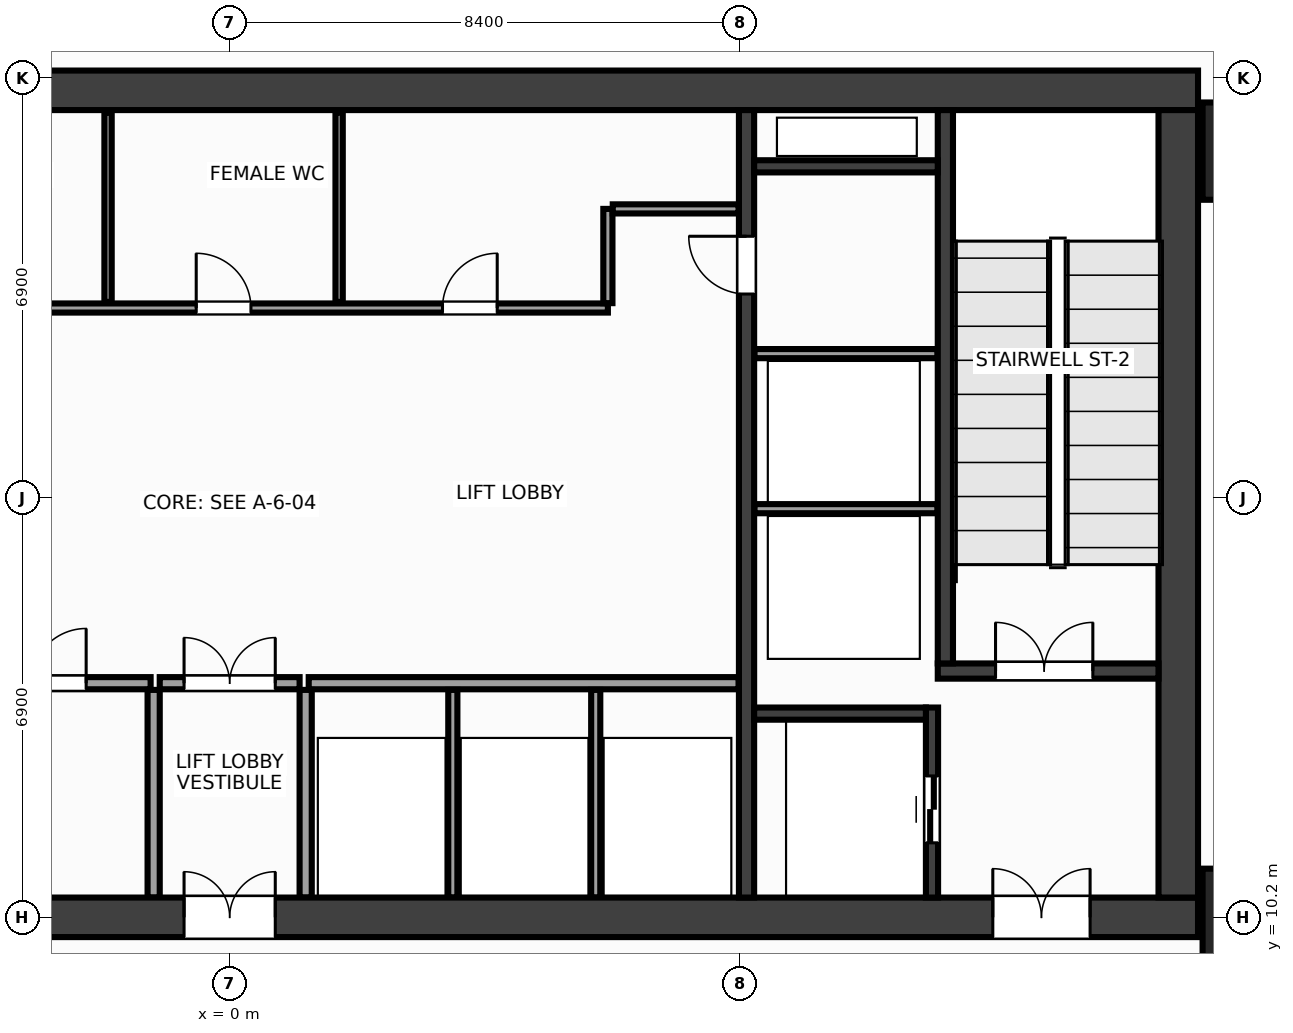
"""IFC4 building model, lengths in metres.
Left out: names, types, materials, properties, quantities, classifications, styles, units other than length and angle.
Written with IfcOpenShell. Run it as: python <this file> out.ifc"""

import sys

from ifc_helpers import new_model, si_unit, direction, frame, frame_2d, origin, origin_2d, place, context, subcontext, project, spatial, rectangle, extrude, source, transform, mapped, element, fill, save


model = new_model("IFC4")
c1 = context("Model", 3, precision=1e-05, world=origin(), true_north=direction((0.0, 1.0)))
c2 = subcontext(c1, "Body", "Model", "MODEL_VIEW")
j1 = project(units=[si_unit("LENGTHUNIT", "METRE"), si_unit("PLANEANGLEUNIT", "RADIAN")], contexts=[c1])
p1 = place(None, origin())
s1 = spatial("IfcSite", under=j1, at=p1, CompositionType="ELEMENT")
p2 = place(p1, origin())
s2 = spatial("IfcBuilding", under=s1, at=p2, CompositionType="ELEMENT")
p3 = place(p2, frame((0.0, 0.0, 124.4)))
s3 = spatial("IfcBuildingStorey", under=s2, at=p3, CompositionType="ELEMENT", Elevation=124.4)
m1 = source(origin(), c2, "Body", "SweptSolid", [
    extrude(rectangle(XDim=31.85, YDim=0.65, at=frame_2d((15.925, 0.0))), origin(), (0.0, 0.0, 1.0), 7.2),
])
p4 = place(p3, frame((-15.925, 23.8, 0.0), z_axis=(0.0, 0.0, 1.0), x_axis=(1.0, 0.0, 0.0)))
e1 = element("IfcWall", 1, at=p4, inside=s3, PredefinedType="SHEAR", context=c2, shape_type="MappedRepresentation", body=[
    mapped(m1, transform((0.0, 0.0, 0.0), x_axis=(1.0, 0.0, 0.0), y_axis=(0.0, 1.0, 0.0), z_axis=(0.0, 0.0, 1.0), scale=1.0)),
])
p5 = place(p3, frame((-15.925, 10.2, 0.0), z_axis=(0.0, 0.0, 1.0), x_axis=(1.0, 0.0, 0.0)))
e2 = element("IfcWall", 2, at=p5, inside=s3, PredefinedType="SHEAR", context=c2, shape_type="MappedRepresentation", body=[
    mapped(m1, transform((0.0, 0.0, 0.0), x_axis=(1.0, 0.0, 0.0), y_axis=(0.0, 1.0, 0.0), z_axis=(0.0, 0.0, 1.0), scale=1.0)),
])
p6 = place(p5, frame((1.775, 0.0, 0.0)))
e3 = element("IfcOpeningElement", 3, at=p6, cuts=e2, PredefinedType="OPENING", context=c2, shape_type="SweptSolid", body=[
    extrude(rectangle(XDim=1.6, YDim=2.15, at=frame_2d((0.8, 1.075))), frame((0.0, 0.337, 0.0), z_axis=(0.0, -1.0, 0.0), x_axis=(1.0, 0.0, 0.0)), (0.0, 0.0, 1.0), 0.674),
])
p7 = place(p5, frame((28.475, 0.0, 0.0)))
e4 = element("IfcOpeningElement", 4, at=p7, cuts=e2, PredefinedType="OPENING", context=c2, shape_type="SweptSolid", body=[
    extrude(rectangle(XDim=1.6, YDim=2.15, at=frame_2d((0.8, 1.075))), frame((0.0, 0.337, 0.0), z_axis=(0.0, -1.0, 0.0), x_axis=(1.0, 0.0, 0.0)), (0.0, 0.0, 1.0), 0.674),
])
p8 = place(p5, frame((15.175, 0.0, 0.0)))
e5 = element("IfcOpeningElement", 5, at=p8, cuts=e2, PredefinedType="OPENING", context=c2, shape_type="SweptSolid", body=[
    extrude(rectangle(XDim=1.5, YDim=2.2, at=frame_2d((0.75, 1.1))), frame((0.0, 0.337, 0.0), z_axis=(0.0, -1.0, 0.0), x_axis=(1.0, 0.0, 0.0)), (0.0, 0.0, 1.0), 0.674),
])
m2 = source(origin(), c2, "Body", "SweptSolid", [
    extrude(rectangle(XDim=12.95, YDim=0.65, at=frame_2d((6.475, 0.0))), origin(), (0.0, 0.0, 1.0), 7.2),
])
p9 = place(p3, frame((15.6, 10.525, 0.0), z_axis=(0.0, 0.0, 1.0), x_axis=(0.0, 1.0, 0.0)))
e6 = element("IfcWall", 6, at=p9, inside=s3, PredefinedType="SHEAR", context=c2, shape_type="MappedRepresentation", body=[
    mapped(m2, transform((0.0, 0.0, 0.0), x_axis=(1.0, 0.0, 0.0), y_axis=(0.0, 1.0, 0.0), z_axis=(0.0, 0.0, 1.0), scale=1.0)),
])
m3 = source(origin(), c2, "Body", "SweptSolid", [
    extrude(rectangle(XDim=12.95, YDim=0.25, at=frame_2d((6.475, 0.0))), origin(), (0.0, 0.0, 1.0), 7.2),
])
p10 = place(p3, frame((8.5, 10.525, 0.0), z_axis=(0.0, 0.0, 1.0), x_axis=(0.0, 1.0, 0.0)))
e7 = element("IfcWall", 7, at=p10, inside=s3, PredefinedType="SHEAR", context=c2, shape_type="MappedRepresentation", body=[
    mapped(m3, transform((0.0, 0.0, 0.0), x_axis=(1.0, 0.0, 0.0), y_axis=(0.0, 1.0, 0.0), z_axis=(0.0, 0.0, 1.0), scale=1.0)),
])
p11 = place(p10, frame((9.925, 0.0, 0.0)))
e8 = element("IfcOpeningElement", 8, at=p11, cuts=e7, PredefinedType="OPENING", context=c2, shape_type="SweptSolid", body=[
    extrude(rectangle(XDim=0.95, YDim=2.15, at=frame_2d((0.475, 1.075))), frame((0.0, 0.137, 0.0), z_axis=(0.0, -1.0, 0.0), x_axis=(1.0, 0.0, 0.0)), (0.0, 0.0, 1.0), 0.274),
])
m4 = source(origin(), c2, "Body", "SweptSolid", [
    extrude(rectangle(XDim=3.63, YDim=0.25, at=frame_2d((1.815, 0.0))), origin(), (0.0, 0.0, 1.0), 7.2),
])
p12 = place(p3, frame((11.645, 14.25, 0.0), z_axis=(0.0, 0.0, 1.0), x_axis=(1.0, 0.0, 0.0)))
e9 = element("IfcWall", 9, at=p12, inside=s3, PredefinedType="SHEAR", context=c2, shape_type="MappedRepresentation", body=[
    mapped(m4, transform((0.0, 0.0, 0.0), x_axis=(1.0, 0.0, 0.0), y_axis=(0.0, 1.0, 0.0), z_axis=(0.0, 0.0, 1.0), scale=1.0)),
])
p13 = place(p12, frame((0.95, 0.0, 0.0)))
e10 = element("IfcOpeningElement", 10, at=p13, cuts=e9, PredefinedType="OPENING", context=c2, shape_type="SweptSolid", body=[
    extrude(rectangle(XDim=1.6, YDim=2.15, at=frame_2d((0.8, 1.075))), frame((0.0, 0.137, 0.0), z_axis=(0.0, -1.0, 0.0), x_axis=(1.0, 0.0, 0.0)), (0.0, 0.0, 1.0), 0.274),
])
m5 = source(origin(), c2, "Body", "SweptSolid", [
    extrude(rectangle(XDim=9.1, YDim=0.25, at=frame_2d((4.55, 0.0))), origin(), (0.0, 0.0, 1.0), 7.2),
])
p14 = place(p3, frame((11.77, 14.375, 0.0), z_axis=(0.0, 0.0, 1.0), x_axis=(0.0, 1.0, 0.0)))
e11 = element("IfcWall", 11, at=p14, inside=s3, PredefinedType="SHEAR", context=c2, shape_type="MappedRepresentation", body=[
    mapped(m5, transform((0.0, 0.0, 0.0), x_axis=(1.0, 0.0, 0.0), y_axis=(0.0, 1.0, 0.0), z_axis=(0.0, 0.0, 1.0), scale=1.0)),
])
m6 = source(origin(), c2, "Body", "SweptSolid", [
    extrude(rectangle(XDim=3.125, YDim=0.2, at=frame_2d((1.562, 0.0))), origin(), (0.0, 0.0, 1.0), 7.2),
])
p15 = place(p3, frame((11.55, 10.525, 0.0), z_axis=(0.0, 0.0, 1.0), x_axis=(0.0, 1.0, 0.0)))
e12 = element("IfcWall", 12, at=p15, inside=s3, PredefinedType="SHEAR", context=c2, shape_type="MappedRepresentation", body=[
    mapped(m6, transform((0.0, 0.0, 0.0), x_axis=(1.0, 0.0, 0.0), y_axis=(0.0, 1.0, 0.0), z_axis=(0.0, 0.0, 1.0), scale=1.0)),
])
p16 = place(p15, frame((0.9, 0.0, 0.0)))
e13 = element("IfcOpeningElement", 13, at=p16, cuts=e12, PredefinedType="OPENING", context=c2, shape_type="SweptSolid", body=[
    extrude(rectangle(XDim=1.1, YDim=2.15, at=frame_2d((0.55, 1.075))), frame((0.0, 0.112, 0.0), z_axis=(0.0, -1.0, 0.0), x_axis=(1.0, 0.0, 0.0)), (0.0, 0.0, 1.0), 0.224),
])
m7 = source(origin(), c2, "Body", "SweptSolid", [
    extrude(rectangle(XDim=2.825, YDim=0.2, at=frame_2d((1.413, 0.0))), origin(), (0.0, 0.0, 1.0), 7.2),
])
p17 = place(p3, frame((8.625, 13.55, 0.0), z_axis=(0.0, 0.0, 1.0), x_axis=(1.0, 0.0, 0.0)))
e14 = element("IfcWall", 14, at=p17, inside=s3, PredefinedType="SHEAR", context=c2, shape_type="MappedRepresentation", body=[
    mapped(m7, transform((0.0, 0.0, 0.0), x_axis=(1.0, 0.0, 0.0), y_axis=(0.0, 1.0, 0.0), z_axis=(0.0, 0.0, 1.0), scale=1.0)),
])
m8 = source(origin(), c2, "Body", "SweptSolid", [
    extrude(rectangle(XDim=3.02, YDim=0.2, at=frame_2d((1.51, 0.0))), origin(), (0.0, 0.0, 1.0), 7.2),
])
p18 = place(p3, frame((8.625, 22.55, 0.0), z_axis=(0.0, 0.0, 1.0), x_axis=(1.0, 0.0, 0.0)))
e15 = element("IfcWall", 15, at=p18, inside=s3, PredefinedType="SHEAR", context=c2, shape_type="MappedRepresentation", body=[
    mapped(m8, transform((0.0, 0.0, 0.0), x_axis=(1.0, 0.0, 0.0), y_axis=(0.0, 1.0, 0.0), z_axis=(0.0, 0.0, 1.0), scale=1.0)),
])
m9 = source(origin(), c2, "Body", "SweptSolid", [
    extrude(rectangle(XDim=1.6, YDim=1.6, at=origin_2d()), origin(), (0.0, 0.0, 1.0), 7.2),
])
for number, where, z_axis, x_axis in (
    (16, (16.8, 10.2, 0.0), (0.0, 0.0, 1.0), (1.0, 0.0, 0.0)),
    (17, (16.8, 22.8, 0.0), (0.0, 0.0, 1.0), (1.0, 0.0, 0.0)),
):
    element("IfcColumn", number, at=place(p3, frame(where, z_axis=z_axis, x_axis=x_axis)), inside=s3, PredefinedType="COLUMN", context=c2, shape_type="MappedRepresentation", body=[
        mapped(m9, transform((0.0, 0.0, 0.0), x_axis=(1.0, 0.0, 0.0), y_axis=(0.0, 1.0, 0.0), z_axis=(0.0, 0.0, 1.0), scale=1.0)),
    ])
m10 = source(origin(), c2, "Body", "SweptSolid", [
    extrude(rectangle(XDim=3.01, YDim=0.15, at=frame_2d((1.505, 0.0))), origin(), (0.0, 0.0, 1.0), 6.9),
])
for number, where, z_axis, x_axis in (
    (18, (8.63, 16.92, 0.0), (0.0, 0.0, 1.0), (1.0, 0.0, 0.0)),
    (19, (8.63, 19.47, 0.0), (0.0, 0.0, 1.0), (1.0, 0.0, 0.0)),
):
    element("IfcWall", number, at=place(p3, frame(where, z_axis=z_axis, x_axis=x_axis)), inside=s3, PredefinedType="PARTITIONING", context=c2, shape_type="MappedRepresentation", body=[
        mapped(m10, transform((0.0, 0.0, 0.0), x_axis=(1.0, 0.0, 0.0), y_axis=(0.0, 1.0, 0.0), z_axis=(0.0, 0.0, 1.0), scale=1.0)),
    ])
m11 = source(origin(), c2, "Body", "SweptSolid", [
    extrude(rectangle(XDim=7.07, YDim=0.2, at=frame_2d((3.535, 0.0))), origin(), (0.0, 0.0, 1.0), 6.9),
])
p19 = place(p3, frame((-8.37, 14.05, 0.0), z_axis=(0.0, 0.0, 1.0), x_axis=(1.0, 0.0, 0.0)))
e20 = element("IfcWall", 20, at=p19, inside=s3, PredefinedType="PARTITIONING", context=c2, shape_type="MappedRepresentation", body=[
    mapped(m11, transform((0.0, 0.0, 0.0), x_axis=(1.0, 0.0, 0.0), y_axis=(0.0, 1.0, 0.0), z_axis=(0.0, 0.0, 1.0), scale=1.0)),
])
p20 = place(p19, frame((1.66, 0.0, 0.0)))
e21 = element("IfcOpeningElement", 21, at=p20, cuts=e20, PredefinedType="OPENING", context=c2, shape_type="SweptSolid", body=[
    extrude(rectangle(XDim=0.9, YDim=2.15, at=frame_2d((0.45, 1.075))), frame((0.0, 0.112, 0.0), z_axis=(0.0, -1.0, 0.0), x_axis=(1.0, 0.0, 0.0)), (0.0, 0.0, 1.0), 0.224),
])
p21 = place(p19, frame((5.11, 0.0, 0.0)))
e22 = element("IfcOpeningElement", 22, at=p21, cuts=e20, PredefinedType="OPENING", context=c2, shape_type="SweptSolid", body=[
    extrude(rectangle(XDim=0.9, YDim=2.15, at=frame_2d((0.45, 1.075))), frame((0.0, 0.112, 0.0), z_axis=(0.0, -1.0, 0.0), x_axis=(1.0, 0.0, 0.0)), (0.0, 0.0, 1.0), 0.224),
])
p22 = place(p3, frame((1.3, 14.05, 0.0), z_axis=(0.0, 0.0, 1.0), x_axis=(1.0, 0.0, 0.0)))
e23 = element("IfcWall", 23, at=p22, inside=s3, PredefinedType="PARTITIONING", context=c2, shape_type="MappedRepresentation", body=[
    mapped(m11, transform((0.0, 0.0, 0.0), x_axis=(1.0, 0.0, 0.0), y_axis=(0.0, 1.0, 0.0), z_axis=(0.0, 0.0, 1.0), scale=1.0)),
])
m12 = source(origin(), c2, "Body", "SweptSolid", [
    extrude(rectangle(XDim=3.415, YDim=0.2, at=frame_2d((1.708, 0.0))), origin(), (0.0, 0.0, 1.0), 6.9),
])
for number, where, z_axis, x_axis in (
    (24, (-1.25, 10.525, 0.0), (0.0, 0.0, 1.0), (0.0, 1.0, 0.0)),
    (25, (1.25, 10.525, 0.0), (0.0, 0.0, 1.0), (0.0, 1.0, 0.0)),
):
    element("IfcWall", number, at=place(p3, frame(where, z_axis=z_axis, x_axis=x_axis)), inside=s3, PredefinedType="PARTITIONING", context=c2, shape_type="MappedRepresentation", body=[
        mapped(m12, transform((0.0, 0.0, 0.0), x_axis=(1.0, 0.0, 0.0), y_axis=(0.0, 1.0, 0.0), z_axis=(0.0, 0.0, 1.0), scale=1.0)),
    ])
m13 = source(origin(), c2, "Body", "SweptSolid", [
    extrude(rectangle(XDim=2.3, YDim=0.2, at=frame_2d((1.15, 0.0))), origin(), (0.0, 0.0, 1.0), 6.9),
])
p23 = place(p3, frame((-1.15, 14.05, 0.0), z_axis=(0.0, 0.0, 1.0), x_axis=(1.0, 0.0, 0.0)))
e26 = element("IfcWall", 26, at=p23, inside=s3, PredefinedType="PARTITIONING", context=c2, shape_type="MappedRepresentation", body=[
    mapped(m13, transform((0.0, 0.0, 0.0), x_axis=(1.0, 0.0, 0.0), y_axis=(0.0, 1.0, 0.0), z_axis=(0.0, 0.0, 1.0), scale=1.0)),
])
p24 = place(p23, frame((0.4, 0.0, 0.0)))
e27 = element("IfcOpeningElement", 27, at=p24, cuts=e26, PredefinedType="OPENING", context=c2, shape_type="SweptSolid", body=[
    extrude(rectangle(XDim=1.5, YDim=2.2, at=frame_2d((0.75, 1.1))), frame((0.0, 0.112, 0.0), z_axis=(0.0, -1.0, 0.0), x_axis=(1.0, 0.0, 0.0)), (0.0, 0.0, 1.0), 0.224),
])
m14 = source(origin(), c2, "Body", "SweptSolid", [
    extrude(rectangle(XDim=14.59, YDim=0.15, at=frame_2d((7.295, 0.0))), origin(), (0.0, 0.0, 1.0), 6.9),
])
p25 = place(p3, frame((-8.37, 20.22, 0.0), z_axis=(0.0, 0.0, 1.0), x_axis=(1.0, 0.0, 0.0)))
e28 = element("IfcWall", 28, at=p25, inside=s3, PredefinedType="PARTITIONING", context=c2, shape_type="MappedRepresentation", body=[
    mapped(m14, transform((0.0, 0.0, 0.0), x_axis=(1.0, 0.0, 0.0), y_axis=(0.0, 1.0, 0.0), z_axis=(0.0, 0.0, 1.0), scale=1.0)),
])
p26 = place(p25, frame((1.06, 0.0, 0.0)))
e29 = element("IfcOpeningElement", 29, at=p26, cuts=e28, PredefinedType="OPENING", context=c2, shape_type="SweptSolid", body=[
    extrude(rectangle(XDim=0.9, YDim=2.15, at=frame_2d((0.45, 1.075))), frame((0.0, 0.087, 0.0), z_axis=(0.0, -1.0, 0.0), x_axis=(1.0, 0.0, 0.0)), (0.0, 0.0, 1.0), 0.174),
])
p27 = place(p25, frame((4.22, 0.0, 0.0)))
e30 = element("IfcOpeningElement", 30, at=p27, cuts=e28, PredefinedType="OPENING", context=c2, shape_type="SweptSolid", body=[
    extrude(rectangle(XDim=0.9, YDim=2.15, at=frame_2d((0.45, 1.075))), frame((0.0, 0.087, 0.0), z_axis=(0.0, -1.0, 0.0), x_axis=(1.0, 0.0, 0.0)), (0.0, 0.0, 1.0), 0.174),
])
p28 = place(p25, frame((7.82, 0.0, 0.0)))
e31 = element("IfcOpeningElement", 31, at=p28, cuts=e28, PredefinedType="OPENING", context=c2, shape_type="SweptSolid", body=[
    extrude(rectangle(XDim=0.9, YDim=2.15, at=frame_2d((0.45, 1.075))), frame((0.0, 0.087, 0.0), z_axis=(0.0, -1.0, 0.0), x_axis=(1.0, 0.0, 0.0)), (0.0, 0.0, 1.0), 0.174),
])
p29 = place(p25, frame((11.87, 0.0, 0.0)))
e32 = element("IfcOpeningElement", 32, at=p29, cuts=e28, PredefinedType="OPENING", context=c2, shape_type="SweptSolid", body=[
    extrude(rectangle(XDim=0.9, YDim=2.15, at=frame_2d((0.45, 1.075))), frame((0.0, 0.087, 0.0), z_axis=(0.0, -1.0, 0.0), x_axis=(1.0, 0.0, 0.0)), (0.0, 0.0, 1.0), 0.174),
])
m15 = source(origin(), c2, "Body", "SweptSolid", [
    extrude(rectangle(XDim=1.55, YDim=0.15, at=frame_2d((0.775, 0.0))), origin(), (0.0, 0.0, 1.0), 6.9),
])
p30 = place(p3, frame((6.22, 20.3, 0.0), z_axis=(0.0, 0.0, 1.0), x_axis=(0.0, 1.0, 0.0)))
e33 = element("IfcWall", 33, at=p30, inside=s3, PredefinedType="PARTITIONING", context=c2, shape_type="MappedRepresentation", body=[
    mapped(m15, transform((0.0, 0.0, 0.0), x_axis=(1.0, 0.0, 0.0), y_axis=(0.0, 1.0, 0.0), z_axis=(0.0, 0.0, 1.0), scale=1.0)),
])
m16 = source(origin(), c2, "Body", "SweptSolid", [
    extrude(rectangle(XDim=2.07, YDim=0.15, at=frame_2d((1.035, 0.0))), origin(), (0.0, 0.0, 1.0), 6.9),
])
p31 = place(p3, frame((6.3, 21.85, 0.0), z_axis=(0.0, 0.0, 1.0), x_axis=(1.0, 0.0, 0.0)))
e34 = element("IfcWall", 34, at=p31, inside=s3, PredefinedType="PARTITIONING", context=c2, shape_type="MappedRepresentation", body=[
    mapped(m16, transform((0.0, 0.0, 0.0), x_axis=(1.0, 0.0, 0.0), y_axis=(0.0, 1.0, 0.0), z_axis=(0.0, 0.0, 1.0), scale=1.0)),
])
m17 = source(origin(), c2, "Body", "SweptSolid", [
    extrude(rectangle(XDim=3.415, YDim=0.15, at=frame_2d((1.708, 0.0))), origin(), (0.0, 0.0, 1.0), 6.9),
])
for number, where, z_axis, x_axis in (
    (35, (3.67, 10.525, 0.0), (0.0, 0.0, 1.0), (0.0, 1.0, 0.0)),
    (36, (6.02, 10.525, 0.0), (0.0, 0.0, 1.0), (0.0, 1.0, 0.0)),
):
    element("IfcWall", number, at=place(p3, frame(where, z_axis=z_axis, x_axis=x_axis)), inside=s3, PredefinedType="PARTITIONING", context=c2, shape_type="MappedRepresentation", body=[
        mapped(m17, transform((0.0, 0.0, 0.0), x_axis=(1.0, 0.0, 0.0), y_axis=(0.0, 1.0, 0.0), z_axis=(0.0, 0.0, 1.0), scale=1.0)),
    ])
m18 = source(origin(), c2, "Body", "SweptSolid", [
    extrude(rectangle(XDim=3.115, YDim=0.12, at=frame_2d((1.558, 0.0))), origin(), (0.0, 0.0, 1.0), 6.9),
])
for number, where, z_axis, x_axis in (
    (37, (-2.0, 20.32, 0.0), (0.0, 0.0, 1.0), (0.0, 1.0, 0.0)),
    (38, (1.8, 20.32, 0.0), (0.0, 0.0, 1.0), (0.0, 1.0, 0.0)),
):
    element("IfcWall", number, at=place(p3, frame(where, z_axis=z_axis, x_axis=x_axis)), inside=s3, PredefinedType="PARTITIONING", context=c2, shape_type="MappedRepresentation", body=[
        mapped(m18, transform((0.0, 0.0, 0.0), x_axis=(1.0, 0.0, 0.0), y_axis=(0.0, 1.0, 0.0), z_axis=(0.0, 0.0, 1.0), scale=1.0)),
    ])
m19 = source(origin(), c2, "Body", "SweptSolid", [
    extrude(rectangle(XDim=1.6, YDim=2.15, at=frame_2d((0.8, 1.075))), frame((0.0, 0.025, 0.0), z_axis=(0.0, -1.0, 0.0), x_axis=(1.0, 0.0, 0.0)), (0.0, 0.0, 1.0), 0.05),
])
p32 = place(p13, origin())
e39 = element("IfcDoor", 39, at=p32, inside=s3, OperationType="DOUBLE_DOOR_SINGLE_SWING", PredefinedType="DOOR", context=c2, shape_type="MappedRepresentation", body=[
    mapped(m19, transform((0.0, 0.0, 0.0), x_axis=(1.0, 0.0, 0.0), y_axis=(0.0, 1.0, 0.0), z_axis=(0.0, 0.0, 1.0), scale=1.0)),
])
fill(e10, e39)
p33 = place(p7, origin())
e40 = element("IfcDoor", 40, at=p33, inside=s3, OperationType="DOUBLE_DOOR_SINGLE_SWING", PredefinedType="DOOR", context=c2, shape_type="MappedRepresentation", body=[
    mapped(m19, transform((0.0, 0.0, 0.0), x_axis=(1.0, 0.0, 0.0), y_axis=(0.0, 1.0, 0.0), z_axis=(0.0, 0.0, 1.0), scale=1.0)),
])
fill(e4, e40)
m20 = source(origin(), c2, "Body", "SweptSolid", [
    extrude(rectangle(XDim=1.1, YDim=2.15, at=frame_2d((0.55, 1.075))), frame((0.0, 0.025, 0.0), z_axis=(0.0, -1.0, 0.0), x_axis=(1.0, 0.0, 0.0)), (0.0, 0.0, 1.0), 0.05),
])
p34 = place(p16, origin())
e41 = element("IfcDoor", 41, at=p34, inside=s3, OperationType="DOUBLE_DOOR_SLIDING", PredefinedType="DOOR", context=c2, shape_type="MappedRepresentation", body=[
    mapped(m20, transform((0.0, 0.0, 0.0), x_axis=(1.0, 0.0, 0.0), y_axis=(0.0, 1.0, 0.0), z_axis=(0.0, 0.0, 1.0), scale=1.0)),
])
fill(e13, e41)
m21 = source(origin(), c2, "Body", "SweptSolid", [
    extrude(rectangle(XDim=0.95, YDim=2.15, at=frame_2d((0.475, 1.075))), frame((0.0, 0.025, 0.0), z_axis=(0.0, -1.0, 0.0), x_axis=(1.0, 0.0, 0.0)), (0.0, 0.0, 1.0), 0.05),
])
p35 = place(p11, origin())
e42 = element("IfcDoor", 42, at=p35, inside=s3, OperationType="SINGLE_SWING_RIGHT", PredefinedType="DOOR", context=c2, shape_type="MappedRepresentation", body=[
    mapped(m21, transform((0.0, 0.0, 0.0), x_axis=(1.0, 0.0, 0.0), y_axis=(0.0, 1.0, 0.0), z_axis=(0.0, 0.0, 1.0), scale=1.0)),
])
fill(e8, e42)
m22 = source(origin(), c2, "Body", "SweptSolid", [
    extrude(rectangle(XDim=0.9, YDim=2.15, at=frame_2d((0.45, 1.075))), frame((0.0, 0.025, 0.0), z_axis=(0.0, -1.0, 0.0), x_axis=(1.0, 0.0, 0.0)), (0.0, 0.0, 1.0), 0.05),
])
p36 = place(p21, origin())
e43 = element("IfcDoor", 43, at=p36, inside=s3, OperationType="SINGLE_SWING_RIGHT", PredefinedType="DOOR", context=c2, shape_type="MappedRepresentation", body=[
    mapped(m22, transform((0.0, 0.0, 0.0), x_axis=(1.0, 0.0, 0.0), y_axis=(0.0, 1.0, 0.0), z_axis=(0.0, 0.0, 1.0), scale=1.0)),
])
fill(e22, e43)
m23 = source(origin(), c2, "Body", "SweptSolid", [
    extrude(rectangle(XDim=1.5, YDim=2.2, at=frame_2d((0.75, 1.1))), frame((0.0, 0.025, 0.0), z_axis=(0.0, -1.0, 0.0), x_axis=(1.0, 0.0, 0.0)), (0.0, 0.0, 1.0), 0.05),
])
p37 = place(p24, origin())
e44 = element("IfcDoor", 44, at=p37, inside=s3, OperationType="DOUBLE_DOOR_SINGLE_SWING", PredefinedType="DOOR", context=c2, shape_type="MappedRepresentation", body=[
    mapped(m23, transform((0.0, 0.0, 0.0), x_axis=(1.0, 0.0, 0.0), y_axis=(0.0, 1.0, 0.0), z_axis=(0.0, 0.0, 1.0), scale=1.0)),
])
fill(e27, e44)
p38 = place(p8, origin())
e45 = element("IfcDoor", 45, at=p38, inside=s3, OperationType="DOUBLE_DOOR_SINGLE_SWING", PredefinedType="DOOR", context=c2, shape_type="MappedRepresentation", body=[
    mapped(m23, transform((0.0, 0.0, 0.0), x_axis=(1.0, 0.0, 0.0), y_axis=(0.0, 1.0, 0.0), z_axis=(0.0, 0.0, 1.0), scale=1.0)),
])
fill(e5, e45)
p39 = place(p28, origin())
e46 = element("IfcDoor", 46, at=p39, inside=s3, OperationType="SINGLE_SWING_LEFT", PredefinedType="DOOR", context=c2, shape_type="MappedRepresentation", body=[
    mapped(m22, transform((0.0, 0.0, 0.0), x_axis=(1.0, 0.0, 0.0), y_axis=(0.0, 1.0, 0.0), z_axis=(0.0, 0.0, 1.0), scale=1.0)),
])
fill(e31, e46)
p40 = place(p29, origin())
e47 = element("IfcDoor", 47, at=p40, inside=s3, OperationType="SINGLE_SWING_RIGHT", PredefinedType="DOOR", context=c2, shape_type="MappedRepresentation", body=[
    mapped(m22, transform((0.0, 0.0, 0.0), x_axis=(1.0, 0.0, 0.0), y_axis=(0.0, 1.0, 0.0), z_axis=(0.0, 0.0, 1.0), scale=1.0)),
])
fill(e32, e47)
save(model, sys.argv[1])
